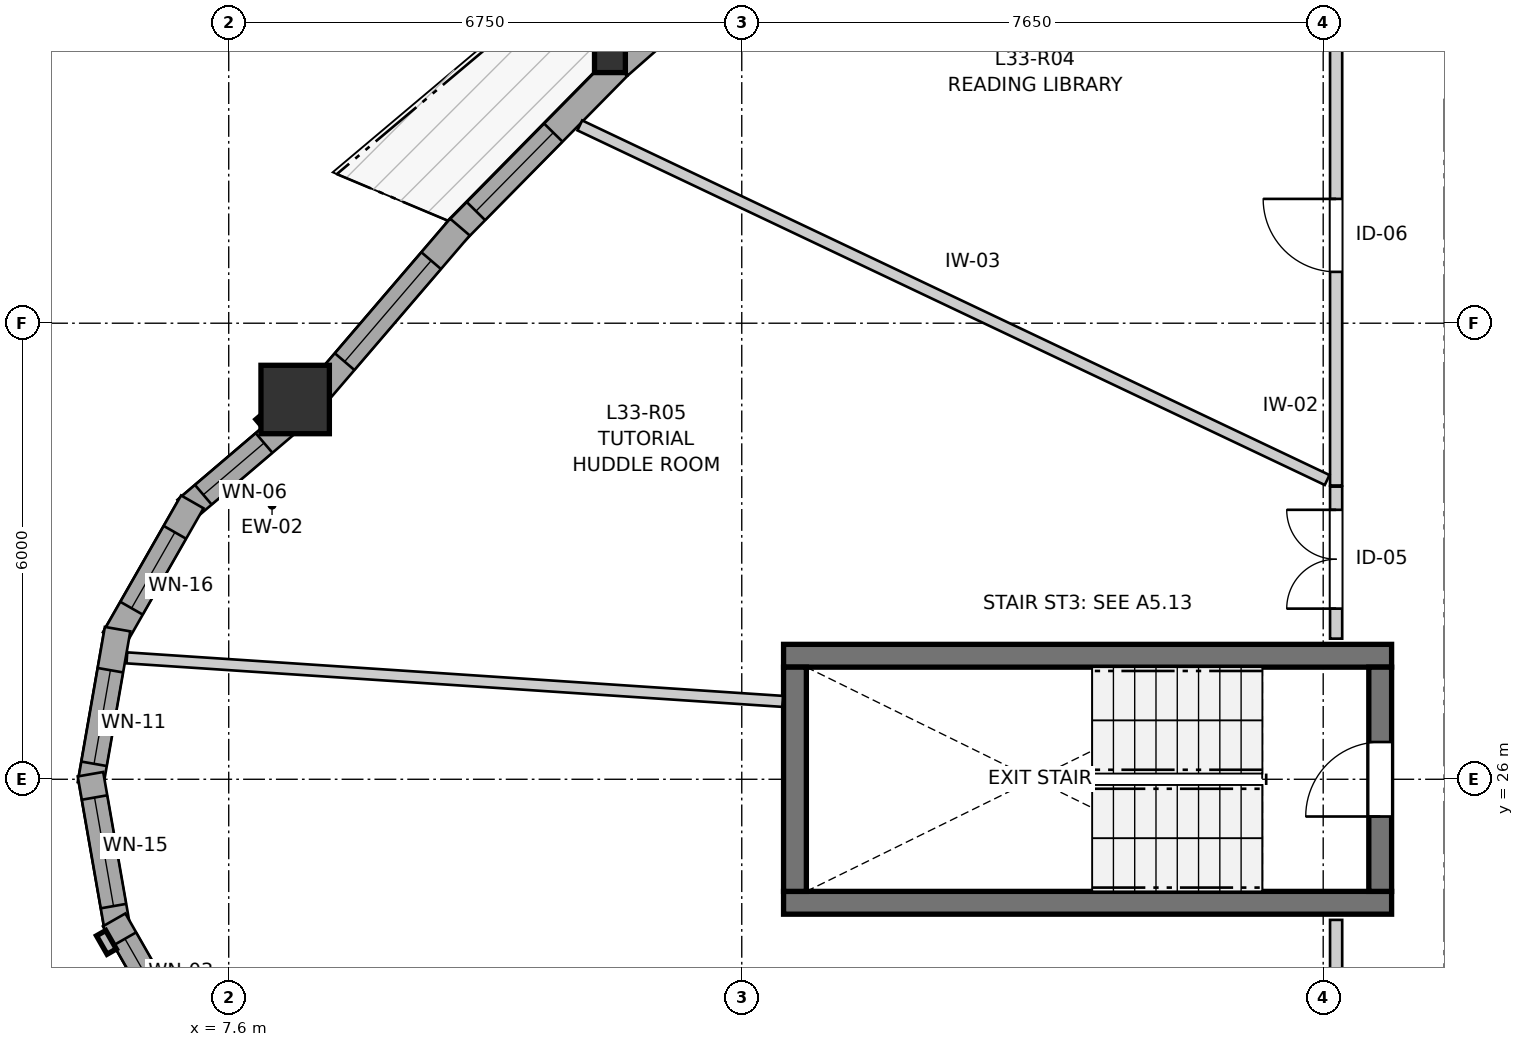
"""IFC4 building model, lengths in metres.
Left out: names, types, materials, properties, quantities, classifications, styles, units other than length and angle.
Written with IfcOpenShell. Run it as: python <this file> out.ifc"""

import sys

from ifc_helpers import new_model, si_unit, direction, frame, frame_2d, origin, origin_2d, place, context, subcontext, project, spatial, rectangle, i_section, extrude, source, transform, mapped, element, fill, save


model = new_model("IFC4")
c1 = context("Model", 3, precision=1e-05, world=origin(), true_north=direction((0.0, 1.0)))
c2 = subcontext(c1, "Body", "Model", "MODEL_VIEW")
j1 = project(units=[si_unit("LENGTHUNIT", "METRE"), si_unit("PLANEANGLEUNIT", "RADIAN")], contexts=[c1])
p1 = place(None, origin())
s1 = spatial("IfcSite", under=j1, at=p1, CompositionType="ELEMENT")
p2 = place(p1, origin())
s2 = spatial("IfcBuilding", under=s1, at=p2, CompositionType="ELEMENT")
p3 = place(p2, frame((0.0, 0.0, 112.0)))
s3 = spatial("IfcBuildingStorey", under=s2, at=p3, CompositionType="ELEMENT", Elevation=112.0)
for number, where, z_axis, x_axis in (
    (1, (14.9, 24.375, 0.0), (0.0, 0.0, 1.0), (1.0, 0.0, 0.0)),
    (2, (22.9, 27.625, 0.0), (0.0, 0.0, 1.0), (-1.0, 0.0, 0.0)),
):
    element("IfcWall", number, at=place(p3, frame(where, z_axis=z_axis, x_axis=x_axis)), inside=s3, PredefinedType="SHEAR", context=c2, shape_type="SweptSolid", body=[
        extrude(rectangle(XDim=8.0, YDim=0.3, at=frame_2d((4.0, 0.0))), origin(), (0.0, 0.0, 1.0), 2.935),
    ])
p4 = place(p3, frame((15.05, 27.475, 0.0), z_axis=(0.0, 0.0, 1.0), x_axis=(0.0, -1.0, 0.0)))
e3 = element("IfcWall", 3, at=p4, inside=s3, PredefinedType="SHEAR", context=c2, shape_type="SweptSolid", body=[
    extrude(rectangle(XDim=2.95, YDim=0.3, at=frame_2d((1.475, 0.0))), origin(), (0.0, 0.0, 1.0), 2.935),
])
p5 = place(p3, frame((22.75, 24.525, 0.0), z_axis=(0.0, 0.0, 1.0), x_axis=(0.0, 1.0, 0.0)))
e4 = element("IfcWall", 4, at=p5, inside=s3, PredefinedType="SHEAR", context=c2, shape_type="SweptSolid", body=[
    extrude(rectangle(XDim=2.95, YDim=0.3, at=frame_2d((1.475, 0.0))), origin(), (0.0, 0.0, 1.0), 2.935),
])
p6 = place(p5, frame((0.985, 0.0, 0.0)))
e5 = element("IfcOpeningElement", 5, at=p6, cuts=e4, PredefinedType="OPENING", context=c2, shape_type="SweptSolid", body=[
    extrude(rectangle(XDim=0.98, YDim=2.15, at=frame_2d((0.49, 1.075))), frame((0.0, 0.16, 0.0), z_axis=(0.0, -1.0, 0.0), x_axis=(1.0, 0.0, 0.0)), (0.0, 0.0, 1.0), 0.32),
])
m1 = source(origin(), c2, "Body", "SweptSolid", [
    extrude(rectangle(XDim=0.9, YDim=0.9, at=origin_2d()), origin(), (0.0, 0.0, 1.0), 2.935),
])
p7 = place(p3, frame((8.474, 30.996, 0.0), z_axis=(0.0, 0.0, 1.0), x_axis=(1.0, 0.0, 0.0)))
e6 = element("IfcColumn", 6, at=p7, inside=s3, PredefinedType="COLUMN", context=c2, shape_type="MappedRepresentation", body=[
    mapped(m1, transform((0.0, 0.0, 0.0), x_axis=(1.0, 0.0, 0.0), y_axis=(0.0, 1.0, 0.0), z_axis=(0.0, 0.0, 1.0), scale=1.0)),
])
m2 = source(origin(), c2, "Body", "SweptSolid", [
    extrude(i_section(OverallWidth=0.406, OverallDepth=0.416, WebThickness=0.027, FlangeThickness=0.044, FilletRadius=0.015, at=origin_2d()), origin(), (0.0, 0.0, 1.0), 2.935),
])
p8 = place(p3, frame((12.616, 35.505, 0.0), z_axis=(0.0, 0.0, 1.0), x_axis=(1.0, 0.0, 0.0)))
e7 = element("IfcColumn", 7, at=p8, inside=s3, PredefinedType="PILASTER", context=c2, shape_type="MappedRepresentation", body=[
    mapped(m2, transform((0.0, 0.0, 0.0), x_axis=(1.0, 0.0, 0.0), y_axis=(0.0, 1.0, 0.0), z_axis=(0.0, 0.0, 1.0), scale=1.0)),
])
p9 = place(p3, frame((8.409, 30.718, 0.0), z_axis=(0.0, 0.0, 1.0), x_axis=(-0.761134405886, -0.648594184507, 0.0)))
e8 = element("IfcWall", 8, at=p9, inside=s3, PredefinedType="SOLIDWALL", context=c2, shape_type="SweptSolid", body=[
    extrude(rectangle(XDim=1.805, YDim=0.34, at=frame_2d((0.902, 0.0))), origin(), (0.0, 0.0, 1.0), 2.465),
])
p10 = place(p9, frame((0.452, 0.0, 0.82)))
e9 = element("IfcOpeningElement", 9, at=p10, cuts=e8, PredefinedType="OPENING", context=c2, shape_type="SweptSolid", body=[
    extrude(rectangle(XDim=1.05, YDim=1.45, at=frame_2d((0.525, 0.725))), frame((0.0, 0.18, 0.0), z_axis=(0.0, -1.0, 0.0), x_axis=(1.0, 0.0, 0.0)), (0.0, 0.0, 1.0), 0.36),
])
p11 = place(p3, frame((7.121, 29.65, 0.0), z_axis=(0.0, 0.0, 1.0), x_axis=(-0.496037473582, -0.868301114132, 0.0)))
e10 = element("IfcWall", 10, at=p11, inside=s3, PredefinedType="SOLIDWALL", context=c2, shape_type="SweptSolid", body=[
    extrude(rectangle(XDim=2.073, YDim=0.34, at=frame_2d((1.037, 0.0))), origin(), (0.0, 0.0, 1.0), 2.465),
])
p12 = place(p11, frame((0.461, 0.0, 0.82)))
e11 = element("IfcOpeningElement", 11, at=p12, cuts=e10, PredefinedType="OPENING", context=c2, shape_type="SweptSolid", body=[
    extrude(rectangle(XDim=1.15, YDim=1.2, at=frame_2d((0.575, 0.6))), frame((0.0, 0.18, 0.0), z_axis=(0.0, -1.0, 0.0), x_axis=(1.0, 0.0, 0.0)), (0.0, 0.0, 1.0), 0.36),
])
p13 = place(p3, frame((6.138, 27.975, 0.0), z_axis=(0.0, 0.0, 1.0), x_axis=(-0.172186061474, -0.985064444711, 0.0)))
e12 = element("IfcWall", 12, at=p13, inside=s3, PredefinedType="SOLIDWALL", context=c2, shape_type="SweptSolid", body=[
    extrude(rectangle(XDim=2.073, YDim=0.34, at=frame_2d((1.037, 0.0))), origin(), (0.0, 0.0, 1.0), 2.465),
])
p14 = place(p13, frame((0.549, 0.0, 0.82)))
e13 = element("IfcOpeningElement", 13, at=p14, cuts=e12, PredefinedType="OPENING", context=c2, shape_type="SweptSolid", body=[
    extrude(rectangle(XDim=1.25, YDim=1.35, at=frame_2d((0.625, 0.675))), frame((0.0, 0.18, 0.0), z_axis=(0.0, -1.0, 0.0), x_axis=(1.0, 0.0, 0.0)), (0.0, 0.0, 1.0), 0.36),
])
p15 = place(p3, frame((5.781, 26.067, 0.0), z_axis=(0.0, 0.0, 1.0), x_axis=(0.172186061474, -0.985064444711, 0.0)))
e14 = element("IfcWall", 14, at=p15, inside=s3, PredefinedType="SOLIDWALL", context=c2, shape_type="SweptSolid", body=[
    extrude(rectangle(XDim=2.073, YDim=0.34, at=frame_2d((1.037, 0.0))), origin(), (0.0, 0.0, 1.0), 2.465),
])
p16 = place(p15, frame((0.312, 0.0, 0.82)))
e15 = element("IfcOpeningElement", 15, at=p16, cuts=e14, PredefinedType="OPENING", context=c2, shape_type="SweptSolid", body=[
    extrude(rectangle(XDim=1.45, YDim=1.25, at=frame_2d((0.725, 0.625))), frame((0.0, 0.18, 0.0), z_axis=(0.0, -1.0, 0.0), x_axis=(1.0, 0.0, 0.0)), (0.0, 0.0, 1.0), 0.36),
])
p17 = place(p3, frame((6.092, 24.15, 0.0), z_axis=(0.0, 0.0, 1.0), x_axis=(0.496037473582, -0.868301114132, 0.0)))
e16 = element("IfcWall", 16, at=p17, inside=s3, PredefinedType="SOLIDWALL", context=c2, shape_type="SweptSolid", body=[
    extrude(rectangle(XDim=2.073, YDim=0.34, at=frame_2d((1.037, 0.0))), origin(), (0.0, 0.0, 1.0), 2.465),
])
p18 = place(p17, frame((0.287, 0.0, 0.82)))
e17 = element("IfcOpeningElement", 17, at=p18, cuts=e16, PredefinedType="OPENING", context=c2, shape_type="SweptSolid", body=[
    extrude(rectangle(XDim=1.5, YDim=1.45, at=frame_2d((0.75, 0.725))), frame((0.0, 0.18, 0.0), z_axis=(0.0, -1.0, 0.0), x_axis=(1.0, 0.0, 0.0)), (0.0, 0.0, 1.0), 0.36),
])
p19 = place(p3, frame((14.997, 37.37, 0.0), z_axis=(0.0, 0.0, 1.0), x_axis=(-0.751446130796, -0.659794447166, 0.0)))
e18 = element("IfcWall", 18, at=p19, inside=s3, PredefinedType="SOLIDWALL", context=c2, shape_type="SweptSolid", body=[
    extrude(rectangle(XDim=3.0, YDim=0.34, at=frame_2d((1.5, 0.0))), origin(), (0.0, 0.0, 1.0), 2.465),
])
p20 = place(p19, frame((1.035, 0.0, 0.82)))
e19 = element("IfcOpeningElement", 19, at=p20, cuts=e18, PredefinedType="OPENING", context=c2, shape_type="SweptSolid", body=[
    extrude(rectangle(XDim=0.95, YDim=1.35, at=frame_2d((0.475, 0.675))), frame((0.0, 0.18, 0.0), z_axis=(0.0, -1.0, 0.0), x_axis=(1.0, 0.0, 0.0)), (0.0, 0.0, 1.0), 0.36),
])
p21 = place(p3, frame((12.723, 35.372, 0.0), z_axis=(0.0, 0.0, 1.0), x_axis=(-0.701922597509, -0.71225323243, 0.0)))
e20 = element("IfcWall", 20, at=p21, inside=s3, PredefinedType="SOLIDWALL", context=c2, shape_type="SweptSolid", body=[
    extrude(rectangle(XDim=3.049, YDim=0.34, at=frame_2d((1.524, 0.0))), origin(), (0.0, 0.0, 1.0), 2.465),
])
p22 = place(p21, frame((1.214, 0.0, 0.82)))
e21 = element("IfcOpeningElement", 21, at=p22, cuts=e20, PredefinedType="OPENING", context=c2, shape_type="SweptSolid", body=[
    extrude(rectangle(XDim=1.45, YDim=1.25, at=frame_2d((0.725, 0.625))), frame((0.0, 0.18, 0.0), z_axis=(0.0, -1.0, 0.0), x_axis=(1.0, 0.0, 0.0)), (0.0, 0.0, 1.0), 0.36),
])
p23 = place(p3, frame((10.642, 33.265, 0.0), z_axis=(0.0, 0.0, 1.0), x_axis=(-0.650694416433, -0.759339697647, 0.0)))
e22 = element("IfcWall", 22, at=p23, inside=s3, PredefinedType="SOLIDWALL", context=c2, shape_type="SweptSolid", body=[
    extrude(rectangle(XDim=2.903, YDim=0.34, at=frame_2d((1.452, 0.0))), origin(), (0.0, 0.0, 1.0), 2.465),
])
p24 = place(p23, frame((0.582, 0.0, 0.82)))
e23 = element("IfcOpeningElement", 23, at=p24, cuts=e22, PredefinedType="OPENING", context=c2, shape_type="SweptSolid", body=[
    extrude(rectangle(XDim=1.75, YDim=1.3, at=frame_2d((0.875, 0.65))), frame((0.0, 0.18, 0.0), z_axis=(0.0, -1.0, 0.0), x_axis=(1.0, 0.0, 0.0)), (0.0, 0.0, 1.0), 0.36),
])
p25 = place(p3, frame((22.17, 29.865, 0.0), z_axis=(0.0, 0.0, 1.0), x_axis=(0.0, 1.0, 0.0)))
e24 = element("IfcWall", 24, at=p25, inside=s3, PredefinedType="PARTITIONING", context=c2, shape_type="SweptSolid", body=[
    extrude(rectangle(XDim=6.565, YDim=0.16, at=frame_2d((3.282, 0.0))), origin(), (0.0, 0.0, 1.0), 2.935),
])
p26 = place(p25, frame((2.811, 0.0, 0.0)))
e25 = element("IfcOpeningElement", 25, at=p26, cuts=e24, PredefinedType="OPENING", context=c2, shape_type="SweptSolid", body=[
    extrude(rectangle(XDim=0.96, YDim=2.1, at=frame_2d((0.48, 1.05))), frame((0.0, 0.09, 0.0), z_axis=(0.0, -1.0, 0.0), x_axis=(1.0, 0.0, 0.0)), (0.0, 0.0, 1.0), 0.18),
])
p27 = place(p3, frame((22.17, 20.14, 0.0), z_axis=(0.0, 0.0, 1.0), x_axis=(0.0, 1.0, 0.0)))
e26 = element("IfcWall", 26, at=p27, inside=s3, PredefinedType="PARTITIONING", context=c2, shape_type="SweptSolid", body=[
    extrude(rectangle(XDim=4.01, YDim=0.16, at=frame_2d((2.005, 0.0))), origin(), (0.0, 0.0, 1.0), 2.935),
])
p28 = place(p27, frame((1.375, 0.0, 0.0)))
e27 = element("IfcOpeningElement", 27, at=p28, cuts=e26, PredefinedType="OPENING", context=c2, shape_type="SweptSolid", body=[
    extrude(rectangle(XDim=1.3, YDim=2.1, at=frame_2d((0.65, 1.05))), frame((0.0, 0.09, 0.0), z_axis=(0.0, -1.0, 0.0), x_axis=(1.0, 0.0, 0.0)), (0.0, 0.0, 1.0), 0.18),
])
p29 = place(p3, frame((22.17, 27.85, 0.0), z_axis=(0.0, 0.0, 1.0), x_axis=(0.0, 1.0, 0.0)))
e28 = element("IfcWall", 28, at=p29, inside=s3, PredefinedType="PARTITIONING", context=c2, shape_type="SweptSolid", body=[
    extrude(rectangle(XDim=2.0, YDim=0.16, at=frame_2d((1.0, 0.0))), origin(), (0.0, 0.0, 1.0), 2.935),
])
p30 = place(p29, frame((0.395, 0.0, 0.0)))
e29 = element("IfcOpeningElement", 29, at=p30, cuts=e28, PredefinedType="OPENING", context=c2, shape_type="SweptSolid", body=[
    extrude(rectangle(XDim=1.3, YDim=2.1, at=frame_2d((0.65, 1.05))), frame((0.0, 0.09, 0.0), z_axis=(0.0, -1.0, 0.0), x_axis=(1.0, 0.0, 0.0)), (0.0, 0.0, 1.0), 0.18),
])
p31 = place(p3, frame((12.219, 34.602, 0.0), z_axis=(0.0, 0.0, 1.0), x_axis=(0.90346129999, -0.428669662351, 0.0)))
e30 = element("IfcWall", 30, at=p31, inside=s3, PredefinedType="PARTITIONING", context=c2, shape_type="SweptSolid", body=[
    extrude(rectangle(XDim=10.883, YDim=0.145, at=frame_2d((5.441, 0.0))), origin(), (0.0, 0.0, 1.0), 2.935),
])
p32 = place(p3, frame((6.26, 27.597, 0.0), z_axis=(0.0, 0.0, 1.0), x_axis=(0.997805352235, -0.066215398902, 0.0)))
e31 = element("IfcWall", 31, at=p32, inside=s3, PredefinedType="PARTITIONING", context=c2, shape_type="SweptSolid", body=[
    extrude(rectangle(XDim=8.646, YDim=0.145, at=frame_2d((4.323, 0.0))), origin(), (0.0, 0.0, 1.0), 2.935),
])
m3 = source(origin(), c2, "Body", "SweptSolid", [
    extrude(rectangle(XDim=1.05, YDim=1.45, at=frame_2d((0.525, 0.725))), frame((0.0, 0.03, 0.0), z_axis=(0.0, -1.0, 0.0), x_axis=(1.0, 0.0, 0.0)), (0.0, 0.0, 1.0), 0.06),
])
p33 = place(p10, origin())
e32 = element("IfcWindow", 32, at=p33, inside=s3, PartitioningType="SINGLE_PANEL", PredefinedType="WINDOW", context=c2, shape_type="MappedRepresentation", body=[
    mapped(m3, transform((0.0, 0.0, 0.0), x_axis=(1.0, 0.0, 0.0), y_axis=(0.0, 1.0, 0.0), z_axis=(0.0, 0.0, 1.0), scale=1.0)),
])
fill(e9, e32)
m4 = source(origin(), c2, "Body", "SweptSolid", [
    extrude(rectangle(XDim=1.15, YDim=1.2, at=frame_2d((0.575, 0.6))), frame((0.0, 0.03, 0.0), z_axis=(0.0, -1.0, 0.0), x_axis=(1.0, 0.0, 0.0)), (0.0, 0.0, 1.0), 0.06),
])
p34 = place(p12, origin())
e33 = element("IfcWindow", 33, at=p34, inside=s3, PartitioningType="SINGLE_PANEL", PredefinedType="WINDOW", context=c2, shape_type="MappedRepresentation", body=[
    mapped(m4, transform((0.0, 0.0, 0.0), x_axis=(1.0, 0.0, 0.0), y_axis=(0.0, 1.0, 0.0), z_axis=(0.0, 0.0, 1.0), scale=1.0)),
])
fill(e11, e33)
m5 = source(origin(), c2, "Body", "SweptSolid", [
    extrude(rectangle(XDim=1.25, YDim=1.35, at=frame_2d((0.625, 0.675))), frame((0.0, 0.03, 0.0), z_axis=(0.0, -1.0, 0.0), x_axis=(1.0, 0.0, 0.0)), (0.0, 0.0, 1.0), 0.06),
])
p35 = place(p14, origin())
e34 = element("IfcWindow", 34, at=p35, inside=s3, PartitioningType="SINGLE_PANEL", PredefinedType="WINDOW", context=c2, shape_type="MappedRepresentation", body=[
    mapped(m5, transform((0.0, 0.0, 0.0), x_axis=(1.0, 0.0, 0.0), y_axis=(0.0, 1.0, 0.0), z_axis=(0.0, 0.0, 1.0), scale=1.0)),
])
fill(e13, e34)
m6 = source(origin(), c2, "Body", "SweptSolid", [
    extrude(rectangle(XDim=1.45, YDim=1.25, at=frame_2d((0.725, 0.625))), frame((0.0, 0.03, 0.0), z_axis=(0.0, -1.0, 0.0), x_axis=(1.0, 0.0, 0.0)), (0.0, 0.0, 1.0), 0.06),
])
p36 = place(p16, origin())
e35 = element("IfcWindow", 35, at=p36, inside=s3, PartitioningType="SINGLE_PANEL", PredefinedType="WINDOW", context=c2, shape_type="MappedRepresentation", body=[
    mapped(m6, transform((0.0, 0.0, 0.0), x_axis=(1.0, 0.0, 0.0), y_axis=(0.0, 1.0, 0.0), z_axis=(0.0, 0.0, 1.0), scale=1.0)),
])
fill(e15, e35)
m7 = source(origin(), c2, "Body", "SweptSolid", [
    extrude(rectangle(XDim=1.5, YDim=1.45, at=frame_2d((0.75, 0.725))), frame((0.0, 0.03, 0.0), z_axis=(0.0, -1.0, 0.0), x_axis=(1.0, 0.0, 0.0)), (0.0, 0.0, 1.0), 0.06),
])
p37 = place(p18, origin())
e36 = element("IfcWindow", 36, at=p37, inside=s3, PartitioningType="SINGLE_PANEL", PredefinedType="WINDOW", context=c2, shape_type="MappedRepresentation", body=[
    mapped(m7, transform((0.0, 0.0, 0.0), x_axis=(1.0, 0.0, 0.0), y_axis=(0.0, 1.0, 0.0), z_axis=(0.0, 0.0, 1.0), scale=1.0)),
])
fill(e17, e36)
p38 = place(p22, origin())
e37 = element("IfcWindow", 37, at=p38, inside=s3, PartitioningType="SINGLE_PANEL", PredefinedType="WINDOW", context=c2, shape_type="MappedRepresentation", body=[
    mapped(m6, transform((0.0, 0.0, 0.0), x_axis=(1.0, 0.0, 0.0), y_axis=(0.0, 1.0, 0.0), z_axis=(0.0, 0.0, 1.0), scale=1.0)),
])
fill(e21, e37)
m8 = source(origin(), c2, "Body", "SweptSolid", [
    extrude(rectangle(XDim=1.75, YDim=1.3, at=frame_2d((0.875, 0.65))), frame((0.0, 0.03, 0.0), z_axis=(0.0, -1.0, 0.0), x_axis=(1.0, 0.0, 0.0)), (0.0, 0.0, 1.0), 0.06),
])
p39 = place(p24, origin())
e38 = element("IfcWindow", 38, at=p39, inside=s3, PartitioningType="SINGLE_PANEL", PredefinedType="WINDOW", context=c2, shape_type="MappedRepresentation", body=[
    mapped(m8, transform((0.0, 0.0, 0.0), x_axis=(1.0, 0.0, 0.0), y_axis=(0.0, 1.0, 0.0), z_axis=(0.0, 0.0, 1.0), scale=1.0)),
])
fill(e23, e38)
m9 = source(origin(), c2, "Body", "SweptSolid", [
    extrude(rectangle(XDim=0.98, YDim=2.15, at=frame_2d((0.49, 1.075))), frame((0.0, 0.025, 0.0), z_axis=(0.0, -1.0, 0.0), x_axis=(1.0, 0.0, 0.0)), (0.0, 0.0, 1.0), 0.05),
])
p40 = place(p6, origin())
e39 = element("IfcDoor", 39, at=p40, inside=s3, OperationType="SINGLE_SWING_LEFT", PredefinedType="DOOR", context=c2, shape_type="MappedRepresentation", body=[
    mapped(m9, transform((0.0, 0.0, 0.0), x_axis=(1.0, 0.0, 0.0), y_axis=(0.0, 1.0, 0.0), z_axis=(0.0, 0.0, 1.0), scale=1.0)),
])
fill(e5, e39)
m10 = source(origin(), c2, "Body", "SweptSolid", [
    extrude(rectangle(XDim=0.96, YDim=2.1, at=frame_2d((0.48, 1.05))), frame((0.0, 0.025, 0.0), z_axis=(0.0, -1.0, 0.0), x_axis=(1.0, 0.0, 0.0)), (0.0, 0.0, 1.0), 0.05),
])
p41 = place(p26, origin())
e40 = element("IfcDoor", 40, at=p41, inside=s3, OperationType="SINGLE_SWING_RIGHT", PredefinedType="DOOR", context=c2, shape_type="MappedRepresentation", body=[
    mapped(m10, transform((0.0, 0.0, 0.0), x_axis=(1.0, 0.0, 0.0), y_axis=(0.0, 1.0, 0.0), z_axis=(0.0, 0.0, 1.0), scale=1.0)),
])
fill(e25, e40)
m11 = source(origin(), c2, "Body", "SweptSolid", [
    extrude(rectangle(XDim=1.3, YDim=2.1, at=frame_2d((0.65, 1.05))), frame((0.0, 0.025, 0.0), z_axis=(0.0, -1.0, 0.0), x_axis=(1.0, 0.0, 0.0)), (0.0, 0.0, 1.0), 0.05),
])
p42 = place(p30, origin())
e41 = element("IfcDoor", 41, at=p42, inside=s3, OperationType="DOUBLE_DOOR_SINGLE_SWING", PredefinedType="DOOR", context=c2, shape_type="MappedRepresentation", body=[
    mapped(m11, transform((0.0, 0.0, 0.0), x_axis=(1.0, 0.0, 0.0), y_axis=(0.0, 1.0, 0.0), z_axis=(0.0, 0.0, 1.0), scale=1.0)),
])
fill(e29, e41)
save(model, sys.argv[1])
